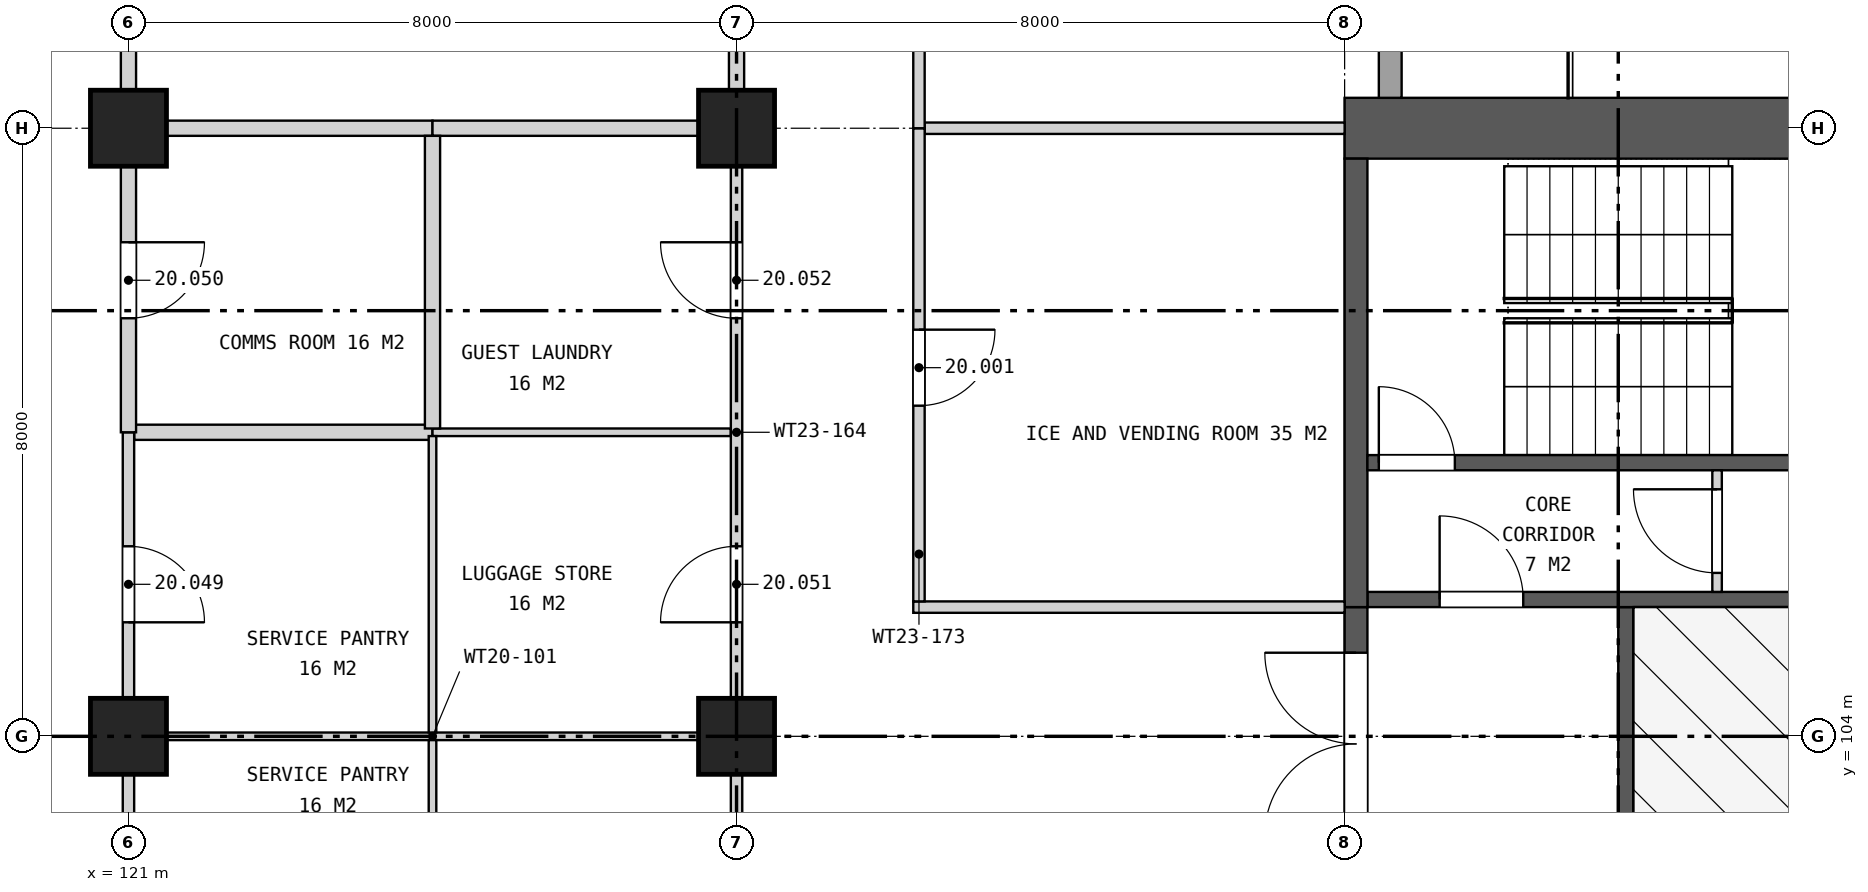
"""IFC4 building model, lengths in metres.
Left out: names, types, materials, properties, quantities, classifications, styles, units other than length and angle.
Written with IfcOpenShell. Run it as: python <this file> out.ifc"""

import sys

from ifc_helpers import new_model, si_unit, direction, frame, frame_2d, origin, origin_2d, place, context, subcontext, project, spatial, rectangle, extrude, element, fill, save


model = new_model("IFC4")
c1 = context("Model", 3, precision=1e-05, world=origin(), true_north=direction((0.0, 1.0)))
c2 = subcontext(c1, "Body", "Model", "MODEL_VIEW")
j1 = project(units=[si_unit("LENGTHUNIT", "METRE"), si_unit("PLANEANGLEUNIT", "RADIAN")], contexts=[c1])
p1 = place(None, origin())
s1 = spatial("IfcSite", under=j1, at=p1, CompositionType="ELEMENT")
p2 = place(p1, origin())
s2 = spatial("IfcBuilding", under=s1, at=p2, CompositionType="ELEMENT")
p3 = place(p2, frame((0.0, 0.0, 101.6)))
s3 = spatial("IfcBuildingStorey", under=s2, at=p3, CompositionType="ELEMENT", Elevation=101.6)
for number, where, z_axis, x_axis in (
    (1, (121.0, 104.0, 0.0), (0.0, 0.0, 1.0), (1.0, 0.0, 0.0)),
    (2, (121.0, 112.0, 0.0), (0.0, 0.0, 1.0), (1.0, 0.0, 0.0)),
    (3, (129.0, 104.0, 0.0), (0.0, 0.0, 1.0), (1.0, 0.0, 0.0)),
    (4, (129.0, 112.0, 0.0), (0.0, 0.0, 1.0), (1.0, 0.0, 0.0)),
):
    element("IfcColumn", number, at=place(p3, frame(where, z_axis=z_axis, x_axis=x_axis)), inside=s3, PredefinedType="COLUMN", context=c2, shape_type="SweptSolid", body=[
        extrude(rectangle(XDim=1.0, YDim=1.0, at=origin_2d()), origin(), (0.0, 0.0, 1.0), 3.7),
    ])
p4 = place(p3, frame((137.0, 112.0, 0.0), z_axis=(0.0, 0.0, 1.0), x_axis=(1.0, 0.0, 0.0)))
e5 = element("IfcWall", 5, at=p4, inside=s3, PredefinedType="SHEAR", context=c2, shape_type="SweptSolid", body=[
    extrude(rectangle(XDim=7.1, YDim=0.8, at=frame_2d((3.55, 0.0))), origin(), (0.0, 0.0, 1.0), 3.7),
])
p5 = place(p3, frame((137.15, 94.3, 0.0), z_axis=(0.0, 0.0, 1.0), x_axis=(0.0, 1.0, 0.0)))
e6 = element("IfcWall", 6, at=p5, inside=s3, PredefinedType="SHEAR", context=c2, shape_type="SweptSolid", body=[
    extrude(rectangle(XDim=11.4, YDim=0.3, at=frame_2d((5.7, 0.0))), origin(), (0.0, 0.0, 1.0), 3.7),
])
p6 = place(p5, frame((0.6, 0.0, 0.0)))
e7 = element("IfcOpeningElement", 7, at=p6, cuts=e6, PredefinedType="OPENING", context=c2, shape_type="SweptSolid", body=[
    extrude(rectangle(XDim=2.4, YDim=2.4, at=frame_2d((1.2, 1.2))), frame((0.0, 0.16, 0.0), z_axis=(0.0, -1.0, 0.0), x_axis=(1.0, 0.0, 0.0)), (0.0, 0.0, 1.0), 0.32),
])
p7 = place(p5, frame((4.5, 0.0, 0.0)))
e8 = element("IfcOpeningElement", 8, at=p7, cuts=e6, PredefinedType="OPENING", context=c2, shape_type="SweptSolid", body=[
    extrude(rectangle(XDim=2.4, YDim=2.4, at=frame_2d((1.2, 1.2))), frame((0.0, 0.16, 0.0), z_axis=(0.0, -1.0, 0.0), x_axis=(1.0, 0.0, 0.0)), (0.0, 0.0, 1.0), 0.32),
])
p8 = place(p5, frame((8.4, 0.0, 0.0)))
e9 = element("IfcOpeningElement", 9, at=p8, cuts=e6, PredefinedType="OPENING", context=c2, shape_type="SweptSolid", body=[
    extrude(rectangle(XDim=2.4, YDim=2.4, at=frame_2d((1.2, 1.2))), frame((0.0, 0.16, 0.0), z_axis=(0.0, -1.0, 0.0), x_axis=(1.0, 0.0, 0.0)), (0.0, 0.0, 1.0), 0.32),
])
p9 = place(p3, frame((140.7, 102.7, 0.0), z_axis=(0.0, 0.0, 1.0), x_axis=(0.0, 1.0, 0.0)))
e10 = element("IfcWall", 10, at=p9, inside=s3, PredefinedType="SHEAR", context=c2, shape_type="SweptSolid", body=[
    extrude(rectangle(XDim=3.0, YDim=0.2, at=frame_2d((1.5, 0.0))), origin(), (0.0, 0.0, 1.0), 3.7),
])
p10 = place(p3, frame((137.3, 105.8, 0.0), z_axis=(0.0, 0.0, 1.0), x_axis=(1.0, 0.0, 0.0)))
e11 = element("IfcWall", 11, at=p10, inside=s3, PredefinedType="SHEAR", context=c2, shape_type="SweptSolid", body=[
    extrude(rectangle(XDim=15.3, YDim=0.2, at=frame_2d((7.65, 0.0))), origin(), (0.0, 0.0, 1.0), 3.7),
])
p11 = place(p10, frame((0.95, 0.0, 0.0)))
e12 = element("IfcOpeningElement", 12, at=p11, cuts=e11, PredefinedType="OPENING", context=c2, shape_type="SweptSolid", body=[
    extrude(rectangle(XDim=1.1, YDim=2.1, at=frame_2d((0.55, 1.05))), frame((0.0, 0.11, 0.0), z_axis=(0.0, -1.0, 0.0), x_axis=(1.0, 0.0, 0.0)), (0.0, 0.0, 1.0), 0.22),
])
p12 = place(p3, frame((137.15, 105.7, 0.0), z_axis=(0.0, 0.0, 1.0), x_axis=(0.0, 1.0, 0.0)))
e13 = element("IfcWall", 13, at=p12, inside=s3, PredefinedType="SHEAR", context=c2, shape_type="SweptSolid", body=[
    extrude(rectangle(XDim=5.9, YDim=0.3, at=frame_2d((2.95, 0.0))), origin(), (0.0, 0.0, 1.0), 3.7),
])
p13 = place(p3, frame((137.3, 107.6, 0.0), z_axis=(0.0, 0.0, 1.0), x_axis=(1.0, 0.0, 0.0)))
e14 = element("IfcWall", 14, at=p13, inside=s3, PredefinedType="SHEAR", context=c2, shape_type="SweptSolid", body=[
    extrude(rectangle(XDim=6.8, YDim=0.2, at=frame_2d((3.4, 0.0))), origin(), (0.0, 0.0, 1.0), 3.7),
])
p14 = place(p13, frame((0.15, 0.0, 0.0)))
e15 = element("IfcOpeningElement", 15, at=p14, cuts=e14, PredefinedType="OPENING", context=c2, shape_type="SweptSolid", body=[
    extrude(rectangle(XDim=1.0, YDim=2.1, at=frame_2d((0.5, 1.05))), frame((0.0, 0.11, 0.0), z_axis=(0.0, -1.0, 0.0), x_axis=(1.0, 0.0, 0.0)), (0.0, 0.0, 1.0), 0.22),
])
p15 = place(p3, frame((141.9, 105.9, 0.0), z_axis=(0.0, 0.0, 1.0), x_axis=(0.0, 1.0, 0.0)))
e16 = element("IfcWall", 16, at=p15, inside=s3, PredefinedType="PARTITIONING", context=c2, shape_type="SweptSolid", body=[
    extrude(rectangle(XDim=1.6, YDim=0.125, at=frame_2d((0.8, 0.0))), origin(), (0.0, 0.0, 1.0), 3.7),
])
p16 = place(p15, frame((0.25, 0.0, 0.0)))
e17 = element("IfcOpeningElement", 17, at=p16, cuts=e16, PredefinedType="OPENING", context=c2, shape_type="SweptSolid", body=[
    extrude(rectangle(XDim=1.1, YDim=2.1, at=frame_2d((0.55, 1.05))), frame((0.0, 0.073, 0.0), z_axis=(0.0, -1.0, 0.0), x_axis=(1.0, 0.0, 0.0)), (0.0, 0.0, 1.0), 0.145),
])
p17 = place(p3, frame((137.6, 112.4, 0.0), z_axis=(0.0, 0.0, 1.0), x_axis=(0.0, 1.0, 0.0)))
e18 = element("IfcWall", 18, at=p17, inside=s3, PredefinedType="SOLIDWALL", context=c2, shape_type="SweptSolid", body=[
    extrude(rectangle(XDim=7.568, YDim=0.3, at=frame_2d((3.784, 0.0))), origin(), (0.0, 0.0, 1.0), 3.3),
])
p18 = place(p17, frame((2.55, 0.0, 0.0)))
e19 = element("IfcOpeningElement", 19, at=p18, cuts=e18, PredefinedType="OPENING", context=c2, shape_type="SweptSolid", body=[
    extrude(rectangle(XDim=2.1, YDim=2.4, at=frame_2d((1.05, 1.2))), frame((0.0, 0.16, 0.0), z_axis=(0.0, -1.0, 0.0), x_axis=(1.0, 0.0, 0.0)), (0.0, 0.0, 1.0), 0.32),
])
p19 = place(p3, frame((121.5, 104.0, 0.0), z_axis=(0.0, 0.0, 1.0), x_axis=(1.0, 0.0, 0.0)))
e20 = element("IfcWall", 20, at=p19, inside=s3, PredefinedType="PARTITIONING", context=c2, shape_type="SweptSolid", body=[
    extrude(rectangle(XDim=7.0, YDim=0.1, at=frame_2d((3.5, 0.0))), origin(), (0.0, 0.0, 1.0), 2.76),
])
p20 = place(p3, frame((131.325, 105.7, 0.0), z_axis=(0.0, 0.0, 1.0), x_axis=(1.0, 0.0, 0.0)))
e21 = element("IfcWall", 21, at=p20, inside=s3, PredefinedType="PARTITIONING", context=c2, shape_type="SweptSolid", body=[
    extrude(rectangle(XDim=5.675, YDim=0.15, at=frame_2d((2.837, 0.0))), origin(), (0.0, 0.0, 1.0), 3.7),
])
p21 = place(p3, frame((121.075, 108.0, 0.0), z_axis=(0.0, 0.0, 1.0), x_axis=(1.0, 0.0, 0.0)))
e22 = element("IfcWall", 22, at=p21, inside=s3, PredefinedType="SOLIDWALL", context=c2, shape_type="SweptSolid", body=[
    extrude(rectangle(XDim=3.925, YDim=0.2, at=frame_2d((1.962, 0.0))), origin(), (0.0, 0.0, 1.0), 2.76),
])
p22 = place(p3, frame((125.0, 108.0, 0.0), z_axis=(0.0, 0.0, 1.0), x_axis=(1.0, 0.0, 0.0)))
e23 = element("IfcWall", 23, at=p22, inside=s3, PredefinedType="PARTITIONING", context=c2, shape_type="SweptSolid", body=[
    extrude(rectangle(XDim=3.925, YDim=0.1, at=frame_2d((1.962, 0.0))), origin(), (0.0, 0.0, 1.0), 2.843),
])
p23 = place(p3, frame((121.5, 112.0, 0.0), z_axis=(0.0, 0.0, 1.0), x_axis=(1.0, 0.0, 0.0)))
e24 = element("IfcWall", 24, at=p23, inside=s3, PredefinedType="SOLIDWALL", context=c2, shape_type="SweptSolid", body=[
    extrude(rectangle(XDim=3.5, YDim=0.2, at=frame_2d((1.75, 0.0))), origin(), (0.0, 0.0, 1.0), 3.7),
])
p24 = place(p3, frame((125.0, 112.0, 0.0), z_axis=(0.0, 0.0, 1.0), x_axis=(1.0, 0.0, 0.0)))
e25 = element("IfcWall", 25, at=p24, inside=s3, PredefinedType="PARTITIONING", context=c2, shape_type="SweptSolid", body=[
    extrude(rectangle(XDim=3.5, YDim=0.2, at=frame_2d((1.75, 0.0))), origin(), (0.0, 0.0, 1.0), 3.7),
])
p25 = place(p3, frame((131.475, 112.0, 0.0), z_axis=(0.0, 0.0, 1.0), x_axis=(1.0, 0.0, 0.0)))
e26 = element("IfcWall", 26, at=p25, inside=s3, PredefinedType="PARTITIONING", context=c2, shape_type="SweptSolid", body=[
    extrude(rectangle(XDim=5.525, YDim=0.15, at=frame_2d((2.762, 0.0))), origin(), (0.0, 0.0, 1.0), 3.7),
])
p26 = place(p3, frame((121.0, 96.5, 0.0), z_axis=(0.0, 0.0, 1.0), x_axis=(0.0, 1.0, 0.0)))
e27 = element("IfcWall", 27, at=p26, inside=s3, PredefinedType="PARTITIONING", context=c2, shape_type="SweptSolid", body=[
    extrude(rectangle(XDim=7.0, YDim=0.15, at=frame_2d((3.5, 0.0))), origin(), (0.0, 0.0, 1.0), 2.76),
])
p27 = place(p26, frame((1.0, 0.0, 0.0)))
e28 = element("IfcOpeningElement", 28, at=p27, cuts=e27, PredefinedType="OPENING", context=c2, shape_type="SweptSolid", body=[
    extrude(rectangle(XDim=1.0, YDim=2.1, at=frame_2d((0.5, 1.05))), frame((0.0, 0.085, 0.0), z_axis=(0.0, -1.0, 0.0), x_axis=(1.0, 0.0, 0.0)), (0.0, 0.0, 1.0), 0.17),
])
p28 = place(p26, frame((5.0, 0.0, 0.0)))
e29 = element("IfcOpeningElement", 29, at=p28, cuts=e27, PredefinedType="OPENING", context=c2, shape_type="SweptSolid", body=[
    extrude(rectangle(XDim=1.0, YDim=2.1, at=frame_2d((0.5, 1.05))), frame((0.0, 0.085, 0.0), z_axis=(0.0, -1.0, 0.0), x_axis=(1.0, 0.0, 0.0)), (0.0, 0.0, 1.0), 0.17),
])
p29 = place(p3, frame((121.0, 104.5, 0.0), z_axis=(0.0, 0.0, 1.0), x_axis=(0.0, 1.0, 0.0)))
e30 = element("IfcWall", 30, at=p29, inside=s3, PredefinedType="PARTITIONING", context=c2, shape_type="SweptSolid", body=[
    extrude(rectangle(XDim=3.5, YDim=0.15, at=frame_2d((1.75, 0.0))), origin(), (0.0, 0.0, 1.0), 2.76),
])
p30 = place(p29, frame((1.0, 0.0, 0.0)))
e31 = element("IfcOpeningElement", 31, at=p30, cuts=e30, PredefinedType="OPENING", context=c2, shape_type="SweptSolid", body=[
    extrude(rectangle(XDim=1.0, YDim=2.1, at=frame_2d((0.5, 1.05))), frame((0.0, 0.085, 0.0), z_axis=(0.0, -1.0, 0.0), x_axis=(1.0, 0.0, 0.0)), (0.0, 0.0, 1.0), 0.17),
])
p31 = place(p3, frame((121.0, 108.0, 0.0), z_axis=(0.0, 0.0, 1.0), x_axis=(0.0, 1.0, 0.0)))
e32 = element("IfcWall", 32, at=p31, inside=s3, PredefinedType="SOLIDWALL", context=c2, shape_type="SweptSolid", body=[
    extrude(rectangle(XDim=3.5, YDim=0.2, at=frame_2d((1.75, 0.0))), origin(), (0.0, 0.0, 1.0), 2.76),
])
p32 = place(p31, frame((1.5, 0.0, 0.0)))
e33 = element("IfcOpeningElement", 33, at=p32, cuts=e32, PredefinedType="OPENING", context=c2, shape_type="SweptSolid", body=[
    extrude(rectangle(XDim=1.0, YDim=2.2, at=frame_2d((0.5, 1.1))), frame((0.0, 0.11, 0.0), z_axis=(0.0, -1.0, 0.0), x_axis=(1.0, 0.0, 0.0)), (0.0, 0.0, 1.0), 0.22),
])
p33 = place(p3, frame((121.0, 112.5, 0.0), z_axis=(0.0, 0.0, 1.0), x_axis=(0.0, 1.0, 0.0)))
e34 = element("IfcWall", 34, at=p33, inside=s3, PredefinedType="PARTITIONING", context=c2, shape_type="SweptSolid", body=[
    extrude(rectangle(XDim=7.0, YDim=0.2, at=frame_2d((3.5, 0.0))), origin(), (0.0, 0.0, 1.0), 2.76),
])
p34 = place(p33, frame((3.0, 0.0, 0.0)))
e35 = element("IfcOpeningElement", 35, at=p34, cuts=e34, PredefinedType="OPENING", context=c2, shape_type="SweptSolid", body=[
    extrude(rectangle(XDim=1.0, YDim=2.1, at=frame_2d((0.5, 1.05))), frame((0.0, 0.11, 0.0), z_axis=(0.0, -1.0, 0.0), x_axis=(1.0, 0.0, 0.0)), (0.0, 0.0, 1.0), 0.22),
])
for number, where, z_axis, x_axis in (
    (36, (125.0, 100.05, 0.0), (0.0, 0.0, 1.0), (0.0, 1.0, 0.0)),
    (37, (125.0, 104.05, 0.0), (0.0, 0.0, 1.0), (0.0, 1.0, 0.0)),
):
    element("IfcWall", number, at=place(p3, frame(where, z_axis=z_axis, x_axis=x_axis)), inside=s3, PredefinedType="PARTITIONING", context=c2, shape_type="SweptSolid", body=[
        extrude(rectangle(XDim=3.9, YDim=0.1, at=frame_2d((1.95, 0.0))), origin(), (0.0, 0.0, 1.0), 2.76),
    ])
p35 = place(p3, frame((125.0, 108.05, 0.0), z_axis=(0.0, 0.0, 1.0), x_axis=(0.0, 1.0, 0.0)))
e38 = element("IfcWall", 38, at=p35, inside=s3, PredefinedType="SOLIDWALL", context=c2, shape_type="SweptSolid", body=[
    extrude(rectangle(XDim=3.85, YDim=0.2, at=frame_2d((1.925, 0.0))), origin(), (0.0, 0.0, 1.0), 2.843),
])
p36 = place(p3, frame((129.0, 96.5, 0.0), z_axis=(0.0, 0.0, 1.0), x_axis=(0.0, 1.0, 0.0)))
e39 = element("IfcWall", 39, at=p36, inside=s3, PredefinedType="PARTITIONING", context=c2, shape_type="SweptSolid", body=[
    extrude(rectangle(XDim=7.0, YDim=0.15, at=frame_2d((3.5, 0.0))), origin(), (0.0, 0.0, 1.0), 2.76),
])
p37 = place(p36, frame((1.0, 0.0, 0.0)))
e40 = element("IfcOpeningElement", 40, at=p37, cuts=e39, PredefinedType="OPENING", context=c2, shape_type="SweptSolid", body=[
    extrude(rectangle(XDim=1.0, YDim=2.1, at=frame_2d((0.5, 1.05))), frame((0.0, 0.085, 0.0), z_axis=(0.0, -1.0, 0.0), x_axis=(1.0, 0.0, 0.0)), (0.0, 0.0, 1.0), 0.17),
])
p38 = place(p36, frame((5.0, 0.0, 0.0)))
e41 = element("IfcOpeningElement", 41, at=p38, cuts=e39, PredefinedType="OPENING", context=c2, shape_type="SweptSolid", body=[
    extrude(rectangle(XDim=1.0, YDim=2.1, at=frame_2d((0.5, 1.05))), frame((0.0, 0.085, 0.0), z_axis=(0.0, -1.0, 0.0), x_axis=(1.0, 0.0, 0.0)), (0.0, 0.0, 1.0), 0.17),
])
p39 = place(p3, frame((129.0, 104.5, 0.0), z_axis=(0.0, 0.0, 1.0), x_axis=(0.0, 1.0, 0.0)))
e42 = element("IfcWall", 42, at=p39, inside=s3, PredefinedType="PARTITIONING", context=c2, shape_type="SweptSolid", body=[
    extrude(rectangle(XDim=7.0, YDim=0.15, at=frame_2d((3.5, 0.0))), origin(), (0.0, 0.0, 1.0), 2.76),
])
p40 = place(p39, frame((1.0, 0.0, 0.0)))
e43 = element("IfcOpeningElement", 43, at=p40, cuts=e42, PredefinedType="OPENING", context=c2, shape_type="SweptSolid", body=[
    extrude(rectangle(XDim=1.0, YDim=2.1, at=frame_2d((0.5, 1.05))), frame((0.0, 0.085, 0.0), z_axis=(0.0, -1.0, 0.0), x_axis=(1.0, 0.0, 0.0)), (0.0, 0.0, 1.0), 0.17),
])
p41 = place(p39, frame((5.0, 0.0, 0.0)))
e44 = element("IfcOpeningElement", 44, at=p41, cuts=e42, PredefinedType="OPENING", context=c2, shape_type="SweptSolid", body=[
    extrude(rectangle(XDim=1.0, YDim=2.1, at=frame_2d((0.5, 1.05))), frame((0.0, 0.085, 0.0), z_axis=(0.0, -1.0, 0.0), x_axis=(1.0, 0.0, 0.0)), (0.0, 0.0, 1.0), 0.17),
])
p42 = place(p3, frame((129.0, 112.5, 0.0), z_axis=(0.0, 0.0, 1.0), x_axis=(0.0, 1.0, 0.0)))
e45 = element("IfcWall", 45, at=p42, inside=s3, PredefinedType="PARTITIONING", context=c2, shape_type="SweptSolid", body=[
    extrude(rectangle(XDim=7.0, YDim=0.2, at=frame_2d((3.5, 0.0))), origin(), (0.0, 0.0, 1.0), 2.76),
])
p43 = place(p3, frame((131.4, 105.775, 0.0), z_axis=(0.0, 0.0, 1.0), x_axis=(0.0, 1.0, 0.0)))
e46 = element("IfcWall", 46, at=p43, inside=s3, PredefinedType="PARTITIONING", context=c2, shape_type="SweptSolid", body=[
    extrude(rectangle(XDim=6.225, YDim=0.15, at=frame_2d((3.113, 0.0))), origin(), (0.0, 0.0, 1.0), 2.843),
])
p44 = place(p43, frame((2.575, 0.0, 0.0)))
e47 = element("IfcOpeningElement", 47, at=p44, cuts=e46, PredefinedType="OPENING", context=c2, shape_type="SweptSolid", body=[
    extrude(rectangle(XDim=1.0, YDim=2.1, at=frame_2d((0.5, 1.05))), frame((0.0, 0.085, 0.0), z_axis=(0.0, -1.0, 0.0), x_axis=(1.0, 0.0, 0.0)), (0.0, 0.0, 1.0), 0.17),
])
p45 = place(p3, frame((131.4, 112.0, 0.0), z_axis=(0.0, 0.0, 1.0), x_axis=(0.0, 1.0, 0.0)))
e48 = element("IfcWall", 48, at=p45, inside=s3, PredefinedType="PARTITIONING", context=c2, shape_type="SweptSolid", body=[
    extrude(rectangle(XDim=24.5, YDim=0.15, at=frame_2d((12.25, 0.0))), origin(), (0.0, 0.0, 1.0), 2.76),
])
p46 = place(p45, frame((1.9, 0.0, 0.0)))
e49 = element("IfcOpeningElement", 49, at=p46, cuts=e48, PredefinedType="OPENING", context=c2, shape_type="SweptSolid", body=[
    extrude(rectangle(XDim=1.2, YDim=2.2, at=frame_2d((0.6, 1.1))), frame((0.0, 0.085, 0.0), z_axis=(0.0, -1.0, 0.0), x_axis=(1.0, 0.0, 0.0)), (0.0, 0.0, 1.0), 0.17),
])
p47 = place(p45, frame((12.9, 0.0, 0.0)))
e50 = element("IfcOpeningElement", 50, at=p47, cuts=e48, PredefinedType="OPENING", context=c2, shape_type="SweptSolid", body=[
    extrude(rectangle(XDim=1.2, YDim=2.2, at=frame_2d((0.6, 1.1))), frame((0.0, 0.085, 0.0), z_axis=(0.0, -1.0, 0.0), x_axis=(1.0, 0.0, 0.0)), (0.0, 0.0, 1.0), 0.17),
])
p48 = place(p45, frame((17.9, 0.0, 0.0)))
e51 = element("IfcOpeningElement", 51, at=p48, cuts=e48, PredefinedType="OPENING", context=c2, shape_type="SweptSolid", body=[
    extrude(rectangle(XDim=1.2, YDim=2.2, at=frame_2d((0.6, 1.1))), frame((0.0, 0.085, 0.0), z_axis=(0.0, -1.0, 0.0), x_axis=(1.0, 0.0, 0.0)), (0.0, 0.0, 1.0), 0.17),
])
p49 = place(p8, origin())
e52 = element("IfcDoor", 52, at=p49, inside=s3, OperationType="DOUBLE_DOOR_SINGLE_SWING", PredefinedType="DOOR", context=c2, shape_type="SweptSolid", body=[
    extrude(rectangle(XDim=2.4, YDim=2.4, at=frame_2d((1.2, 1.2))), frame((0.0, 0.025, 0.0), z_axis=(0.0, -1.0, 0.0), x_axis=(1.0, 0.0, 0.0)), (0.0, 0.0, 1.0), 0.05),
])
fill(e9, e52)
p50 = place(p11, origin())
e53 = element("IfcDoor", 53, at=p50, inside=s3, OperationType="SINGLE_SWING_LEFT", PredefinedType="DOOR", context=c2, shape_type="SweptSolid", body=[
    extrude(rectangle(XDim=1.1, YDim=2.1, at=frame_2d((0.55, 1.05))), frame((0.0, 0.025, 0.0), z_axis=(0.0, -1.0, 0.0), x_axis=(1.0, 0.0, 0.0)), (0.0, 0.0, 1.0), 0.05),
])
fill(e12, e53)
p51 = place(p14, origin())
e54 = element("IfcDoor", 54, at=p51, inside=s3, OperationType="SINGLE_SWING_LEFT", PredefinedType="DOOR", context=c2, shape_type="SweptSolid", body=[
    extrude(rectangle(XDim=1.0, YDim=2.1, at=frame_2d((0.5, 1.05))), frame((0.0, 0.025, 0.0), z_axis=(0.0, -1.0, 0.0), x_axis=(1.0, 0.0, 0.0)), (0.0, 0.0, 1.0), 0.05),
])
fill(e15, e54)
p52 = place(p16, origin())
e55 = element("IfcDoor", 55, at=p52, inside=s3, OperationType="SINGLE_SWING_RIGHT", PredefinedType="DOOR", context=c2, shape_type="SweptSolid", body=[
    extrude(rectangle(XDim=1.1, YDim=2.1, at=frame_2d((0.55, 1.05))), frame((0.0, 0.025, 0.0), z_axis=(0.0, -1.0, 0.0), x_axis=(1.0, 0.0, 0.0)), (0.0, 0.0, 1.0), 0.05),
])
fill(e17, e55)
p53 = place(p44, frame((1.0, 0.0, 0.0), z_axis=(0.0, 0.0, 1.0), x_axis=(-1.0, 0.0, 0.0)))
e56 = element("IfcDoor", 56, at=p53, inside=s3, OperationType="SINGLE_SWING_LEFT", PredefinedType="DOOR", context=c2, shape_type="SweptSolid", body=[
    extrude(rectangle(XDim=1.0, YDim=2.1, at=frame_2d((0.5, 1.05))), frame((0.0, 0.025, 0.0), z_axis=(0.0, -1.0, 0.0), x_axis=(1.0, 0.0, 0.0)), (0.0, 0.0, 1.0), 0.05),
])
fill(e47, e56)
p54 = place(p30, frame((1.0, 0.0, 0.0), z_axis=(0.0, 0.0, 1.0), x_axis=(-1.0, 0.0, 0.0)))
e57 = element("IfcDoor", 57, at=p54, inside=s3, OperationType="SINGLE_SWING_RIGHT", PredefinedType="DOOR", context=c2, shape_type="SweptSolid", body=[
    extrude(rectangle(XDim=1.0, YDim=2.1, at=frame_2d((0.5, 1.05))), frame((0.0, 0.025, 0.0), z_axis=(0.0, -1.0, 0.0), x_axis=(1.0, 0.0, 0.0)), (0.0, 0.0, 1.0), 0.05),
])
fill(e31, e57)
p55 = place(p32, frame((1.0, 0.0, 0.0), z_axis=(0.0, 0.0, 1.0), x_axis=(-1.0, 0.0, 0.0)))
e58 = element("IfcDoor", 58, at=p55, inside=s3, OperationType="SINGLE_SWING_LEFT", PredefinedType="DOOR", context=c2, shape_type="SweptSolid", body=[
    extrude(rectangle(XDim=1.0, YDim=2.2, at=frame_2d((0.5, 1.1))), frame((0.0, 0.025, 0.0), z_axis=(0.0, -1.0, 0.0), x_axis=(1.0, 0.0, 0.0)), (0.0, 0.0, 1.0), 0.05),
])
fill(e33, e58)
p56 = place(p40, origin())
e59 = element("IfcDoor", 59, at=p56, inside=s3, OperationType="SINGLE_SWING_LEFT", PredefinedType="DOOR", context=c2, shape_type="SweptSolid", body=[
    extrude(rectangle(XDim=1.0, YDim=2.1, at=frame_2d((0.5, 1.05))), frame((0.0, 0.025, 0.0), z_axis=(0.0, -1.0, 0.0), x_axis=(1.0, 0.0, 0.0)), (0.0, 0.0, 1.0), 0.05),
])
fill(e43, e59)
p57 = place(p41, origin())
e60 = element("IfcDoor", 60, at=p57, inside=s3, OperationType="SINGLE_SWING_RIGHT", PredefinedType="DOOR", context=c2, shape_type="SweptSolid", body=[
    extrude(rectangle(XDim=1.0, YDim=2.1, at=frame_2d((0.5, 1.05))), frame((0.0, 0.025, 0.0), z_axis=(0.0, -1.0, 0.0), x_axis=(1.0, 0.0, 0.0)), (0.0, 0.0, 1.0), 0.05),
])
fill(e44, e60)
save(model, sys.argv[1])
